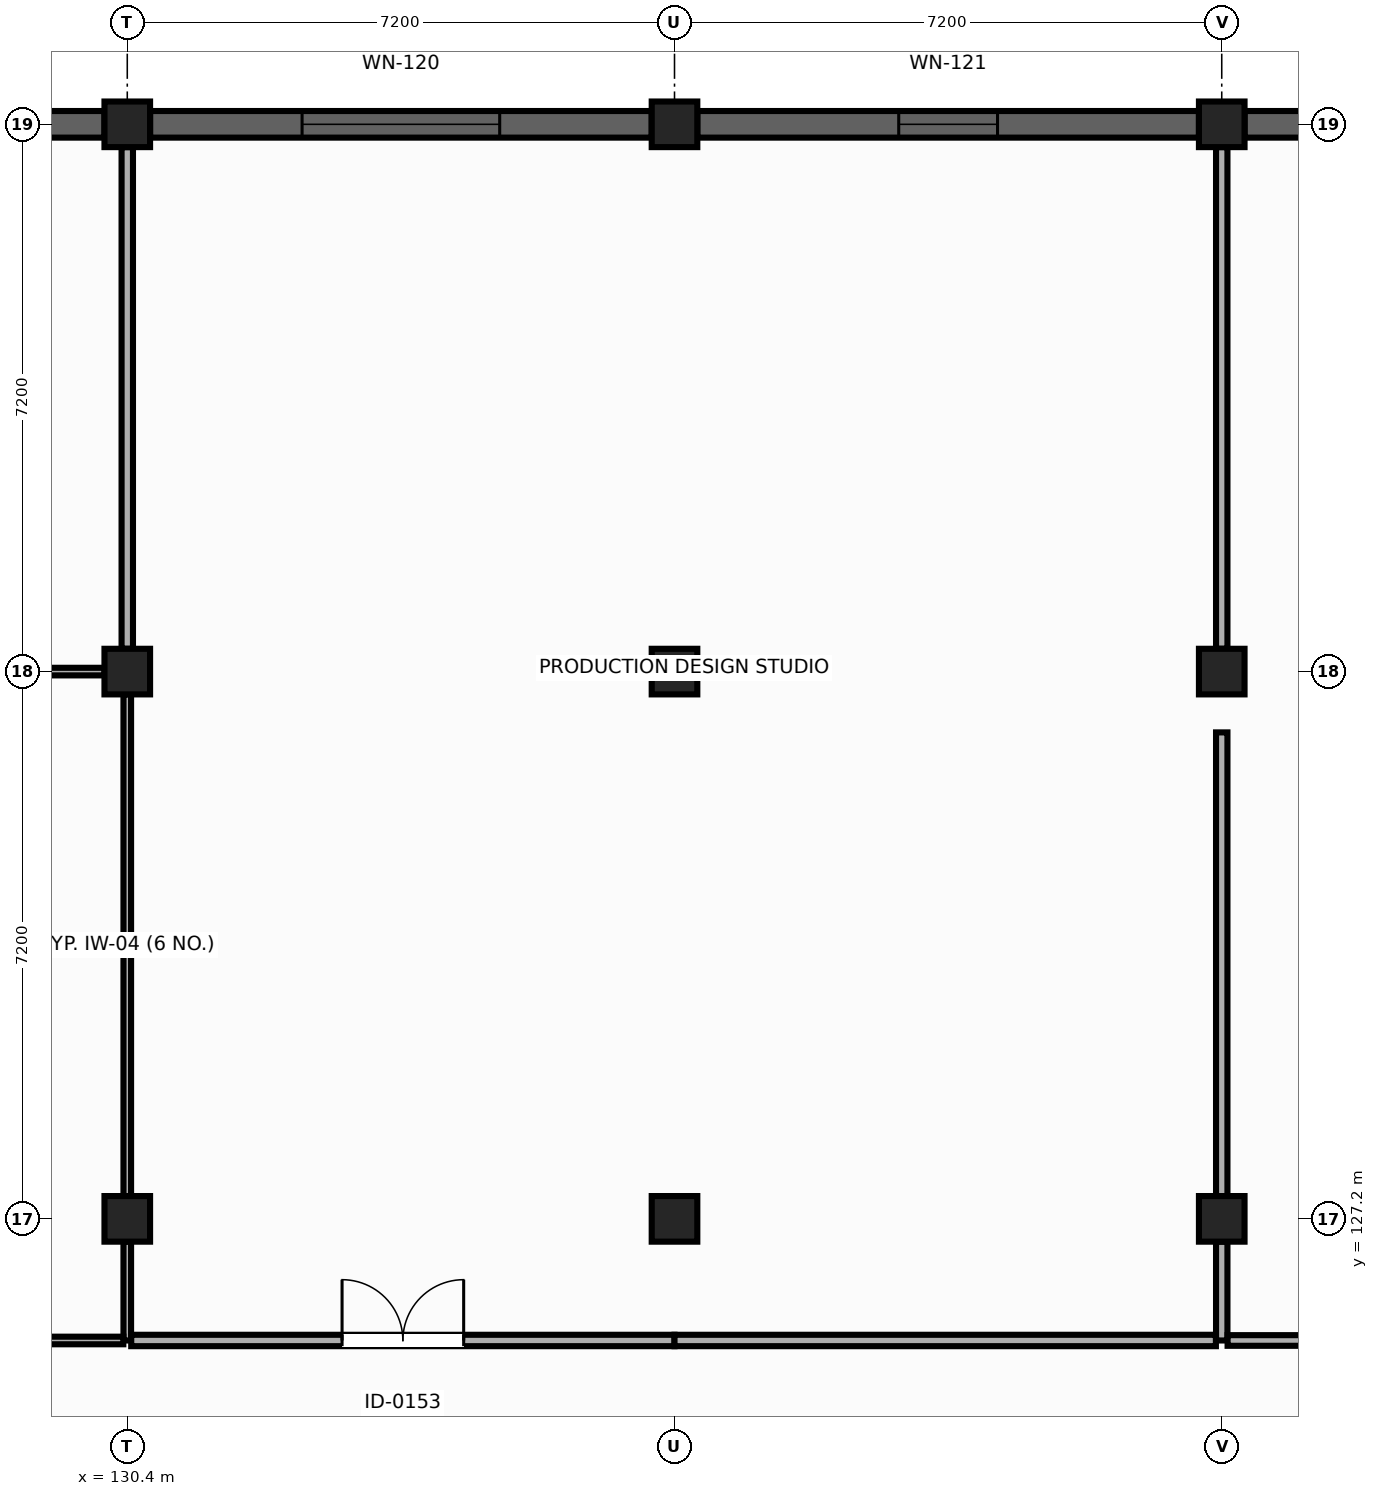
"""IFC4 building model, lengths in metres.
Left out: names, types, materials, properties, quantities, classifications, styles, units other than length and angle.
Written with IfcOpenShell. Run it as: python <this file> out.ifc"""

import sys

from ifc_helpers import new_model, si_unit, direction, frame, frame_2d, origin, origin_2d, place, context, subcontext, project, spatial, rectangle, extrude, element, fill, save


model = new_model("IFC4")
c1 = context("Model", 3, precision=1e-05, world=origin(), true_north=direction((0.0, 1.0)))
c2 = subcontext(c1, "Body", "Model", "MODEL_VIEW")
j1 = project(units=[si_unit("LENGTHUNIT", "METRE"), si_unit("PLANEANGLEUNIT", "RADIAN")], contexts=[c1])
p1 = place(None, origin())
s1 = spatial("IfcSite", under=j1, at=p1, CompositionType="ELEMENT")
p2 = place(p1, origin())
s2 = spatial("IfcBuilding", under=s1, at=p2, CompositionType="ELEMENT")
p3 = place(p2, frame((0.0, 0.0, 18.9)))
s3 = spatial("IfcBuildingStorey", under=s2, at=p3, CompositionType="ELEMENT", Elevation=18.9)
for number, where, z_axis, x_axis in (
    (1, (130.4, 127.2, 0.0), (0.0, 0.0, 1.0), (0.0, 1.0, 0.0)),
    (2, (137.6, 127.2, 0.0), (0.0, 0.0, 1.0), (1.0, 0.0, 0.0)),
):
    element("IfcColumn", number, at=place(p3, frame(where, z_axis=z_axis, x_axis=x_axis)), inside=s3, PredefinedType="COLUMN", context=c2, shape_type="SweptSolid", body=[
        extrude(rectangle(XDim=0.6, YDim=0.6, at=origin_2d()), origin(), (0.0, 0.0, 1.0), 4.2),
    ])
p4 = place(p3, frame((144.8, 127.2, 0.0), z_axis=(0.0, 0.0, 1.0), x_axis=(1.0, 0.0, 0.0)))
e3 = element("IfcColumn", 3, at=p4, inside=s3, PredefinedType="COLUMN", context=c2, shape_type="SweptSolid", body=[
    extrude(rectangle(XDim=0.6, YDim=0.6, at=origin_2d()), origin(), (0.0, 0.0, 1.0), 6.997),
])
for number, where, z_axis, x_axis in (
    (4, (130.4, 134.4, 0.0), (0.0, 0.0, 1.0), (1.0, 0.0, 0.0)),
    (5, (137.6, 134.4, 0.0), (0.0, 0.0, 1.0), (1.0, 0.0, 0.0)),
):
    element("IfcColumn", number, at=place(p3, frame(where, z_axis=z_axis, x_axis=x_axis)), inside=s3, PredefinedType="COLUMN", context=c2, shape_type="SweptSolid", body=[
        extrude(rectangle(XDim=0.6, YDim=0.6, at=origin_2d()), origin(), (0.0, 0.0, 1.0), 4.2),
    ])
p5 = place(p3, frame((144.8, 134.4, 0.0), z_axis=(0.0, 0.0, 1.0), x_axis=(0.0, 1.0, 0.0)))
e6 = element("IfcColumn", 6, at=p5, inside=s3, PredefinedType="COLUMN", context=c2, shape_type="SweptSolid", body=[
    extrude(rectangle(XDim=0.6, YDim=0.6, at=origin_2d()), origin(), (0.0, 0.0, 1.0), 5.521),
])
for number, where, z_axis, x_axis in (
    (7, (130.4, 141.6, 0.0), (0.0, 0.0, 1.0), (1.0, 0.0, 0.0)),
    (8, (137.6, 141.6, 0.0), (0.0, 0.0, 1.0), (0.0, 1.0, 0.0)),
):
    element("IfcColumn", number, at=place(p3, frame(where, z_axis=z_axis, x_axis=x_axis)), inside=s3, PredefinedType="COLUMN", context=c2, shape_type="SweptSolid", body=[
        extrude(rectangle(XDim=0.6, YDim=0.6, at=origin_2d()), origin(), (0.0, 0.0, 1.0), 4.2),
    ])
p6 = place(p3, frame((144.8, 141.6, 0.0), z_axis=(0.0, 0.0, 1.0), x_axis=(1.0, 0.0, 0.0)))
e9 = element("IfcColumn", 9, at=p6, inside=s3, PredefinedType="COLUMN", context=c2, shape_type="SweptSolid", body=[
    extrude(rectangle(XDim=0.6, YDim=0.6, at=origin_2d()), origin(), (0.0, 0.0, 1.0), 4.046),
])
p7 = place(p3, frame((123.5, 141.6, 0.0), z_axis=(0.0, 0.0, 1.0), x_axis=(1.0, 0.0, 0.0)))
e10 = element("IfcWall", 10, at=p7, inside=s3, PredefinedType="SOLIDWALL", context=c2, shape_type="SweptSolid", body=[
    extrude(rectangle(XDim=6.6, YDim=0.35, at=frame_2d((3.3, 0.0))), origin(), (0.0, 0.0, 1.0), 3.95),
])
p8 = place(p7, frame((2.3, 0.0, 0.9)))
e11 = element("IfcOpeningElement", 11, at=p8, cuts=e10, PredefinedType="OPENING", context=c2, shape_type="SweptSolid", body=[
    extrude(rectangle(XDim=2.0, YDim=2.4, at=frame_2d((1.0, 1.2))), frame((0.0, 0.185, 0.0), z_axis=(0.0, -1.0, 0.0), x_axis=(1.0, 0.0, 0.0)), (0.0, 0.0, 1.0), 0.37),
])
p9 = place(p3, frame((130.7, 141.6, 0.0), z_axis=(0.0, 0.0, 1.0), x_axis=(1.0, 0.0, 0.0)))
e12 = element("IfcWall", 12, at=p9, inside=s3, PredefinedType="SOLIDWALL", context=c2, shape_type="SweptSolid", body=[
    extrude(rectangle(XDim=6.6, YDim=0.35, at=frame_2d((3.3, 0.0))), origin(), (0.0, 0.0, 1.0), 3.95),
])
p10 = place(p9, frame((2.0, 0.0, 0.9)))
e13 = element("IfcOpeningElement", 13, at=p10, cuts=e12, PredefinedType="OPENING", context=c2, shape_type="SweptSolid", body=[
    extrude(rectangle(XDim=2.6, YDim=2.4, at=frame_2d((1.3, 1.2))), frame((0.0, 0.185, 0.0), z_axis=(0.0, -1.0, 0.0), x_axis=(1.0, 0.0, 0.0)), (0.0, 0.0, 1.0), 0.37),
])
p11 = place(p3, frame((137.9, 141.6, 0.0), z_axis=(0.0, 0.0, 1.0), x_axis=(1.0, 0.0, 0.0)))
e14 = element("IfcWall", 14, at=p11, inside=s3, PredefinedType="SOLIDWALL", context=c2, shape_type="SweptSolid", body=[
    extrude(rectangle(XDim=6.6, YDim=0.35, at=frame_2d((3.3, 0.0))), origin(), (0.0, 0.0, 1.0), 4.046),
])
p12 = place(p11, frame((2.65, 0.0, 0.9)))
e15 = element("IfcOpeningElement", 15, at=p12, cuts=e14, PredefinedType="OPENING", context=c2, shape_type="SweptSolid", body=[
    extrude(rectangle(XDim=1.3, YDim=1.6, at=frame_2d((0.65, 0.8))), frame((0.0, 0.185, 0.0), z_axis=(0.0, -1.0, 0.0), x_axis=(1.0, 0.0, 0.0)), (0.0, 0.0, 1.0), 0.37),
])
p13 = place(p3, frame((145.1, 141.6, 0.0), z_axis=(0.0, 0.0, 1.0), x_axis=(1.0, 0.0, 0.0)))
e16 = element("IfcWall", 16, at=p13, inside=s3, PredefinedType="SOLIDWALL", context=c2, shape_type="SweptSolid", body=[
    extrude(rectangle(XDim=6.6, YDim=0.35, at=frame_2d((3.3, 0.0))), origin(), (0.0, 0.0, 1.0), 4.046),
])
p14 = place(p13, frame((2.45, 0.0, 0.9)))
e17 = element("IfcOpeningElement", 17, at=p14, cuts=e16, PredefinedType="OPENING", context=c2, shape_type="SweptSolid", body=[
    extrude(rectangle(XDim=1.7, YDim=1.6, at=frame_2d((0.85, 0.8))), frame((0.0, 0.185, 0.0), z_axis=(0.0, -1.0, 0.0), x_axis=(1.0, 0.0, 0.0)), (0.0, 0.0, 1.0), 0.37),
])
p15 = place(p3, frame((130.4, 127.5, 0.0), z_axis=(0.0, 0.0, 1.0), x_axis=(0.0, 1.0, 0.0)))
e18 = element("IfcWall", 18, at=p15, inside=s3, PredefinedType="PARTITIONING", context=c2, shape_type="SweptSolid", body=[
    extrude(rectangle(XDim=6.6, YDim=0.1, at=frame_2d((3.3, 0.0))), origin(), (0.0, 0.0, 1.0), 3.245),
])
p16 = place(p3, frame((130.4, 125.6, 0.0), z_axis=(0.0, 0.0, 1.0), x_axis=(0.0, 1.0, 0.0)))
e19 = element("IfcWall", 19, at=p16, inside=s3, PredefinedType="PARTITIONING", context=c2, shape_type="SweptSolid", body=[
    extrude(rectangle(XDim=1.3, YDim=0.1, at=frame_2d((0.65, 0.0))), origin(), (0.0, 0.0, 1.0), 3.245),
])
p17 = place(p3, frame((130.1, 134.4, 0.0), z_axis=(0.0, 0.0, 1.0), x_axis=(-1.0, 0.0, 0.0)))
e20 = element("IfcWall", 20, at=p17, inside=s3, PredefinedType="PARTITIONING", context=c2, shape_type="SweptSolid", body=[
    extrude(rectangle(XDim=6.6, YDim=0.1, at=frame_2d((3.3, 0.0))), origin(), (0.0, 0.0, 1.0), 3.445),
])
p18 = place(p3, frame((123.2, 125.6, 0.0), z_axis=(0.0, 0.0, 1.0), x_axis=(1.0, 0.0, 0.0)))
e21 = element("IfcWall", 21, at=p18, inside=s3, PredefinedType="PARTITIONING", context=c2, shape_type="SweptSolid", body=[
    extrude(rectangle(XDim=7.148, YDim=0.1, at=frame_2d((3.574, 0.0))), origin(), (0.0, 0.0, 1.0), 3.245),
])
p19 = place(p3, frame((144.8, 127.5, 0.0), z_axis=(0.0, 0.0, 1.0), x_axis=(0.0, 1.0, 0.0)))
e22 = element("IfcWall", 22, at=p19, inside=s3, PredefinedType="PARTITIONING", context=c2, shape_type="SweptSolid", body=[
    extrude(rectangle(XDim=6.1, YDim=0.15, at=frame_2d((3.05, 0.0))), origin(), (0.0, 0.0, 1.0), 6.31),
])
p20 = place(p3, frame((144.8, 125.6, 0.0), z_axis=(0.0, 0.0, 1.0), x_axis=(0.0, 1.0, 0.0)))
e23 = element("IfcWall", 23, at=p20, inside=s3, PredefinedType="PARTITIONING", context=c2, shape_type="SweptSolid", body=[
    extrude(rectangle(XDim=1.3, YDim=0.15, at=frame_2d((0.65, 0.0))), origin(), (0.0, 0.0, 1.0), 6.802),
])
p21 = place(p3, frame((144.8, 134.7, 0.0), z_axis=(0.0, 0.0, 1.0), x_axis=(0.0, 1.0, 0.0)))
e24 = element("IfcWall", 24, at=p21, inside=s3, PredefinedType="PARTITIONING", context=c2, shape_type="SweptSolid", body=[
    extrude(rectangle(XDim=6.6, YDim=0.15, at=frame_2d((3.3, 0.0))), origin(), (0.0, 0.0, 1.0), 4.784),
])
p22 = place(p3, frame((130.4, 141.3, 0.0), z_axis=(0.0, 0.0, 1.0), x_axis=(0.0, -1.0, 0.0)))
e25 = element("IfcWall", 25, at=p22, inside=s3, PredefinedType="PARTITIONING", context=c2, shape_type="SweptSolid", body=[
    extrude(rectangle(XDim=6.6, YDim=0.15, at=frame_2d((3.3, 0.0))), origin(), (0.0, 0.0, 1.0), 3.245),
])
p23 = place(p3, frame((130.452, 125.6, 0.0), z_axis=(0.0, 0.0, 1.0), x_axis=(1.0, 0.0, 0.0)))
e26 = element("IfcWall", 26, at=p23, inside=s3, PredefinedType="PARTITIONING", context=c2, shape_type="SweptSolid", body=[
    extrude(rectangle(XDim=7.148, YDim=0.15, at=frame_2d((3.574, 0.0))), origin(), (0.0, 0.0, 1.0), 3.245),
])
p24 = place(p23, frame((2.774, 0.0, 0.0)))
e27 = element("IfcOpeningElement", 27, at=p24, cuts=e26, PredefinedType="OPENING", context=c2, shape_type="SweptSolid", body=[
    extrude(rectangle(XDim=1.6, YDim=2.25, at=frame_2d((0.8, 1.125))), frame((0.0, 0.085, 0.0), z_axis=(0.0, -1.0, 0.0), x_axis=(1.0, 0.0, 0.0)), (0.0, 0.0, 1.0), 0.17),
])
p25 = place(p3, frame((137.6, 125.6, 0.0), z_axis=(0.0, 0.0, 1.0), x_axis=(1.0, 0.0, 0.0)))
e28 = element("IfcWall", 28, at=p25, inside=s3, PredefinedType="PARTITIONING", context=c2, shape_type="SweptSolid", body=[
    extrude(rectangle(XDim=7.123, YDim=0.15, at=frame_2d((3.562, 0.0))), origin(), (0.0, 0.0, 1.0), 3.245),
])
p26 = place(p3, frame((144.877, 125.6, 0.0), z_axis=(0.0, 0.0, 1.0), x_axis=(1.0, 0.0, 0.0)))
e29 = element("IfcWall", 29, at=p26, inside=s3, PredefinedType="PARTITIONING", context=c2, shape_type="SweptSolid", body=[
    extrude(rectangle(XDim=7.123, YDim=0.14, at=frame_2d((3.562, 0.0))), origin(), (0.0, 0.0, 1.0), 6.669),
])
p27 = place(p10, origin())
e30 = element("IfcWindow", 30, at=p27, inside=s3, PartitioningType="SINGLE_PANEL", PredefinedType="WINDOW", context=c2, shape_type="SweptSolid", body=[
    extrude(rectangle(XDim=2.6, YDim=2.4, at=frame_2d((1.3, 1.2))), frame((0.0, 0.03, 0.0), z_axis=(0.0, -1.0, 0.0), x_axis=(1.0, 0.0, 0.0)), (0.0, 0.0, 1.0), 0.06),
])
fill(e13, e30)
p28 = place(p12, origin())
e31 = element("IfcWindow", 31, at=p28, inside=s3, PartitioningType="SINGLE_PANEL", PredefinedType="WINDOW", context=c2, shape_type="SweptSolid", body=[
    extrude(rectangle(XDim=1.3, YDim=1.6, at=frame_2d((0.65, 0.8))), frame((0.0, 0.03, 0.0), z_axis=(0.0, -1.0, 0.0), x_axis=(1.0, 0.0, 0.0)), (0.0, 0.0, 1.0), 0.06),
])
fill(e15, e31)
p29 = place(p24, origin())
e32 = element("IfcDoor", 32, at=p29, inside=s3, OperationType="DOUBLE_DOOR_SINGLE_SWING", PredefinedType="DOOR", context=c2, shape_type="SweptSolid", body=[
    extrude(rectangle(XDim=1.6, YDim=2.25, at=frame_2d((0.8, 1.125))), frame((0.0, 0.025, 0.0), z_axis=(0.0, -1.0, 0.0), x_axis=(1.0, 0.0, 0.0)), (0.0, 0.0, 1.0), 0.05),
])
fill(e27, e32)
save(model, sys.argv[1])
